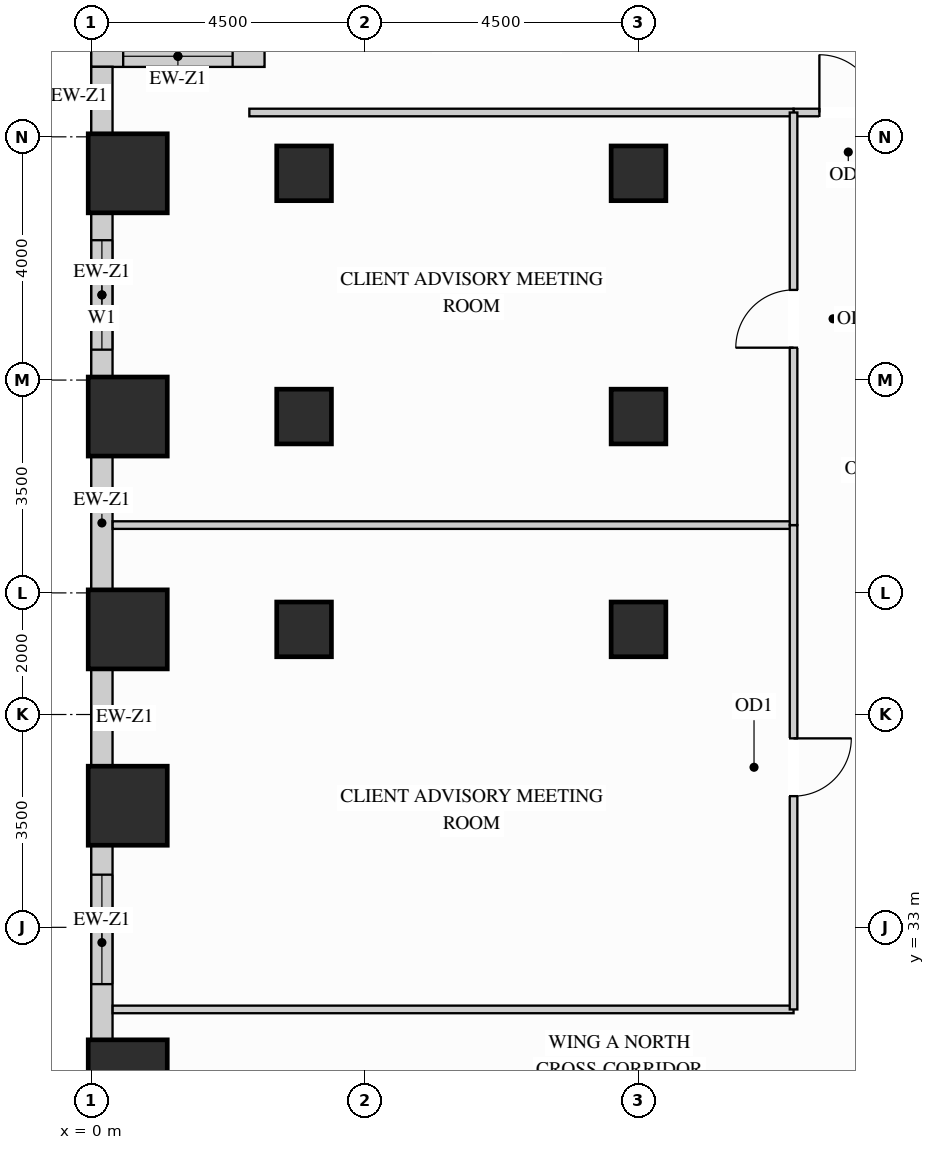
"""IFC4 building model, lengths in metres.
Left out: names, types, materials, properties, quantities, classifications, styles, units other than length and angle.
Written with IfcOpenShell. Run it as: python <this file> out.ifc"""

import sys

from ifc_helpers import new_model, si_unit, direction, frame, frame_2d, origin, origin_2d, place, context, subcontext, project, spatial, rectangle, extrude, source, transform, mapped, element, fill, save


model = new_model("IFC4")
c1 = context("Model", 3, precision=1e-05, world=origin(), true_north=direction((0.0, 1.0)))
c2 = subcontext(c1, "Body", "Model", "MODEL_VIEW")
j1 = project(units=[si_unit("LENGTHUNIT", "METRE"), si_unit("PLANEANGLEUNIT", "RADIAN")], contexts=[c1])
p1 = place(None, origin())
s1 = spatial("IfcSite", under=j1, at=p1, CompositionType="ELEMENT")
p2 = place(p1, origin())
s2 = spatial("IfcBuilding", under=s1, at=p2, CompositionType="ELEMENT")
p3 = place(p2, frame((0.0, 0.0, 40.5)))
s3 = spatial("IfcBuildingStorey", under=s2, at=p3, CompositionType="ELEMENT", Elevation=40.5)
m1 = source(origin(), c2, "Body", "SweptSolid", [
    extrude(rectangle(XDim=0.9, YDim=0.9, at=origin_2d()), origin(), (0.0, 0.0, 1.0), 3.38),
])
for number, where, z_axis, x_axis in (
    (1, (3.5, 37.9, 0.0), (0.0, 0.0, 1.0), (1.0, 0.0, 0.0)),
    (2, (3.5, 41.4, 0.0), (0.0, 0.0, 1.0), (1.0, 0.0, 0.0)),
    (3, (3.5, 45.4, 0.0), (0.0, 0.0, 1.0), (1.0, 0.0, 0.0)),
    (4, (9.0, 37.9, 0.0), (0.0, 0.0, 1.0), (1.0, 0.0, 0.0)),
    (5, (9.0, 41.4, 0.0), (0.0, 0.0, 1.0), (1.0, 0.0, 0.0)),
    (6, (9.0, 45.4, 0.0), (0.0, 0.0, 1.0), (1.0, 0.0, 0.0)),
):
    element("IfcColumn", number, at=place(p3, frame(where, z_axis=z_axis, x_axis=x_axis)), inside=s3, PredefinedType="COLUMN", context=c2, shape_type="MappedRepresentation", body=[
        mapped(m1, transform((0.0, 0.0, 0.0), x_axis=(1.0, 0.0, 0.0), y_axis=(0.0, 1.0, 0.0), z_axis=(0.0, 0.0, 1.0))),
    ])
m2 = source(origin(), c2, "Body", "SweptSolid", [
    extrude(rectangle(XDim=1.3, YDim=1.3, at=origin_2d()), origin(), (0.0, 0.0, 1.0), 3.38),
])
for number, where, z_axis, x_axis in (
    (7, (0.6, 30.5, 0.0), (0.0, 0.0, 1.0), (1.0, 0.0, 0.0)),
    (8, (0.6, 35.0, 0.0), (0.0, 0.0, 1.0), (1.0, 0.0, 0.0)),
    (9, (0.6, 37.9, 0.0), (0.0, 0.0, 1.0), (1.0, 0.0, 0.0)),
    (10, (0.6, 41.4, 0.0), (0.0, 0.0, 1.0), (1.0, 0.0, 0.0)),
    (11, (0.6, 45.4, 0.0), (0.0, 0.0, 1.0), (1.0, 0.0, 0.0)),
):
    element("IfcColumn", number, at=place(p3, frame(where, z_axis=z_axis, x_axis=x_axis)), inside=s3, PredefinedType="COLUMN", context=c2, shape_type="MappedRepresentation", body=[
        mapped(m2, transform((0.0, 0.0, 0.0), x_axis=(1.0, 0.0, 0.0), y_axis=(0.0, 1.0, 0.0), z_axis=(0.0, 0.0, 1.0))),
    ])
p4 = place(p3, frame((2.85, 47.325, 0.0), z_axis=(0.0, 0.0, 1.0), x_axis=(-1.0, 0.0, 0.0)))
e12 = element("IfcWall", 12, at=p4, inside=s3, PredefinedType="SOLIDWALL", context=c2, shape_type="SweptSolid", body=[
    extrude(rectangle(XDim=2.85, YDim=0.35, at=frame_2d((1.425, 0.0))), origin(), (0.0, 0.0, 1.0), 3.365),
])
p5 = place(p4, frame((0.525, 0.0, 0.78)))
e13 = element("IfcOpeningElement", 13, at=p5, cuts=e12, PredefinedType="OPENING", context=c2, shape_type="SweptSolid", body=[
    extrude(rectangle(XDim=1.8, YDim=2.1, at=frame_2d((0.9, 1.05))), frame((0.0, 0.185, 0.0), z_axis=(0.0, -1.0, 0.0), x_axis=(1.0, 0.0, 0.0)), (0.0, 0.0, 1.0), 0.37),
])
m3 = source(origin(), c2, "Body", "SweptSolid", [
    extrude(rectangle(XDim=1.104, YDim=0.35, at=frame_2d((0.552, 0.0))), origin(), (0.0, 0.0, 1.0), 3.365),
])
p6 = place(p3, frame((0.175, 47.152, 0.0), z_axis=(0.0, 0.0, 1.0), x_axis=(0.0, -1.0, 0.0)))
e14 = element("IfcWall", 14, at=p6, inside=s3, PredefinedType="SOLIDWALL", context=c2, shape_type="MappedRepresentation", body=[
    mapped(m3, transform((0.0, 0.0, 0.0), x_axis=(1.0, 0.0, 0.0), y_axis=(0.0, 1.0, 0.0), z_axis=(0.0, 0.0, 1.0))),
])
p7 = place(p3, frame((0.175, 44.752, 0.0), z_axis=(0.0, 0.0, 1.0), x_axis=(0.0, -1.0, 0.0)))
e15 = element("IfcWall", 15, at=p7, inside=s3, PredefinedType="SOLIDWALL", context=c2, shape_type="SweptSolid", body=[
    extrude(rectangle(XDim=2.704, YDim=0.35, at=frame_2d((1.352, 0.0))), origin(), (0.0, 0.0, 1.0), 2.51),
])
p8 = place(p7, frame((0.452, 0.0, 0.78)))
e16 = element("IfcOpeningElement", 16, at=p8, cuts=e15, PredefinedType="OPENING", context=c2, shape_type="SweptSolid", body=[
    extrude(rectangle(XDim=1.8, YDim=1.55, at=frame_2d((0.9, 0.775))), frame((0.0, 0.185, 0.0), z_axis=(0.0, -1.0, 0.0), x_axis=(1.0, 0.0, 0.0)), (0.0, 0.0, 1.0), 0.37),
])
m4 = source(origin(), c2, "Body", "SweptSolid", [
    extrude(rectangle(XDim=2.204, YDim=0.35, at=frame_2d((1.102, 0.0))), origin(), (0.0, 0.0, 1.0), 2.51),
])
p9 = place(p3, frame((0.175, 40.752, 0.0), z_axis=(0.0, 0.0, 1.0), x_axis=(0.0, -1.0, 0.0)))
e17 = element("IfcWall", 17, at=p9, inside=s3, PredefinedType="SOLIDWALL", context=c2, shape_type="MappedRepresentation", body=[
    mapped(m4, transform((0.0, 0.0, 0.0), x_axis=(1.0, 0.0, 0.0), y_axis=(0.0, 1.0, 0.0), z_axis=(0.0, 0.0, 1.0))),
])
m5 = source(origin(), c2, "Body", "SweptSolid", [
    extrude(rectangle(XDim=1.604, YDim=0.35, at=frame_2d((0.802, 0.0))), origin(), (0.0, 0.0, 1.0), 2.51),
])
p10 = place(p3, frame((0.175, 37.252, 0.0), z_axis=(0.0, 0.0, 1.0), x_axis=(0.0, -1.0, 0.0)))
e18 = element("IfcWall", 18, at=p10, inside=s3, PredefinedType="SOLIDWALL", context=c2, shape_type="MappedRepresentation", body=[
    mapped(m5, transform((0.0, 0.0, 0.0), x_axis=(1.0, 0.0, 0.0), y_axis=(0.0, 1.0, 0.0), z_axis=(0.0, 0.0, 1.0))),
])
p11 = place(p3, frame((0.175, 34.352, 0.0), z_axis=(0.0, 0.0, 1.0), x_axis=(0.0, -1.0, 0.0)))
e19 = element("IfcWall", 19, at=p11, inside=s3, PredefinedType="SOLIDWALL", context=c2, shape_type="SweptSolid", body=[
    extrude(rectangle(XDim=3.204, YDim=0.35, at=frame_2d((1.602, 0.0))), origin(), (0.0, 0.0, 1.0), 2.51),
])
p12 = place(p11, frame((0.486, 0.0, 0.78)))
e20 = element("IfcOpeningElement", 20, at=p12, cuts=e19, PredefinedType="OPENING", context=c2, shape_type="SweptSolid", body=[
    extrude(rectangle(XDim=1.8, YDim=1.55, at=frame_2d((0.9, 0.775))), frame((0.0, 0.185, 0.0), z_axis=(0.0, -1.0, 0.0), x_axis=(1.0, 0.0, 0.0)), (0.0, 0.0, 1.0), 0.37),
])
m6 = source(origin(), c2, "Body", "SweptSolid", [
    extrude(rectangle(XDim=11.198, YDim=0.125, at=frame_2d((5.599, 0.0))), origin(), (0.0, 0.0, 1.0), 2.828),
])
for number, where, z_axis, x_axis in (
    (21, (0.352, 31.65, 0.0), (0.0, 0.0, 1.0), (1.0, 0.0, 0.0)),
    (22, (0.352, 39.615, 0.0), (0.0, 0.0, 1.0), (1.0, 0.0, 0.0)),
):
    element("IfcWall", number, at=place(p3, frame(where, z_axis=z_axis, x_axis=x_axis)), inside=s3, PredefinedType="PARTITIONING", context=c2, shape_type="MappedRepresentation", body=[
        mapped(m6, transform((0.0, 0.0, 0.0), x_axis=(1.0, 0.0, 0.0), y_axis=(0.0, 1.0, 0.0), z_axis=(0.0, 0.0, 1.0))),
    ])
p13 = place(p3, frame((11.55, 46.4, 0.0), z_axis=(0.0, 0.0, 1.0), x_axis=(1.0, 0.0, 0.0)))
e23 = element("IfcWall", 23, at=p13, inside=s3, PredefinedType="PARTITIONING", context=c2, shape_type="SweptSolid", body=[
    extrude(rectangle(XDim=1.8, YDim=0.125, at=frame_2d((0.9, 0.0))), origin(), (0.0, 0.0, 1.0), 3.365),
])
p14 = place(p13, frame((0.425, 0.0, 0.0)))
e24 = element("IfcOpeningElement", 24, at=p14, cuts=e23, PredefinedType="OPENING", context=c2, shape_type="SweptSolid", body=[
    extrude(rectangle(XDim=0.95, YDim=2.15, at=frame_2d((0.475, 1.075))), frame((0.0, 0.073, 0.0), z_axis=(0.0, -1.0, 0.0), x_axis=(1.0, 0.0, 0.0)), (0.0, 0.0, 1.0), 0.145),
])
m7 = source(origin(), c2, "Body", "SweptSolid", [
    extrude(rectangle(XDim=8.95, YDim=0.125, at=frame_2d((4.475, 0.0))), origin(), (0.0, 0.0, 1.0), 3.365),
])
p15 = place(p3, frame((2.6, 46.4, 0.0), z_axis=(0.0, 0.0, 1.0), x_axis=(1.0, 0.0, 0.0)))
e25 = element("IfcWall", 25, at=p15, inside=s3, PredefinedType="PARTITIONING", context=c2, shape_type="MappedRepresentation", body=[
    mapped(m7, transform((0.0, 0.0, 0.0), x_axis=(1.0, 0.0, 0.0), y_axis=(0.0, 1.0, 0.0), z_axis=(0.0, 0.0, 1.0))),
])
p16 = place(p3, frame((11.55, 31.65, 0.0), z_axis=(0.0, 0.0, 1.0), x_axis=(0.0, 1.0, 0.0)))
e26 = element("IfcWall", 26, at=p16, inside=s3, PredefinedType="PARTITIONING", context=c2, shape_type="SweptSolid", body=[
    extrude(rectangle(XDim=7.965, YDim=0.125, at=frame_2d((3.982, 0.0))), origin(), (0.0, 0.0, 1.0), 3.365),
])
p17 = place(p16, frame((3.508, 0.0, 0.0)))
e27 = element("IfcOpeningElement", 27, at=p17, cuts=e26, PredefinedType="OPENING", context=c2, shape_type="SweptSolid", body=[
    extrude(rectangle(XDim=0.95, YDim=2.15, at=frame_2d((0.475, 1.075))), frame((0.0, 0.073, 0.0), z_axis=(0.0, -1.0, 0.0), x_axis=(1.0, 0.0, 0.0)), (0.0, 0.0, 1.0), 0.145),
])
p18 = place(p3, frame((11.55, 39.615, 0.0), z_axis=(0.0, 0.0, 1.0), x_axis=(0.0, 1.0, 0.0)))
e28 = element("IfcWall", 28, at=p18, inside=s3, PredefinedType="PARTITIONING", context=c2, shape_type="SweptSolid", body=[
    extrude(rectangle(XDim=6.785, YDim=0.125, at=frame_2d((3.393, 0.0))), origin(), (0.0, 0.0, 1.0), 3.365),
])
p19 = place(p18, frame((2.917, 0.0, 0.0)))
e29 = element("IfcOpeningElement", 29, at=p19, cuts=e28, PredefinedType="OPENING", context=c2, shape_type="SweptSolid", body=[
    extrude(rectangle(XDim=0.95, YDim=2.15, at=frame_2d((0.475, 1.075))), frame((0.0, 0.073, 0.0), z_axis=(0.0, -1.0, 0.0), x_axis=(1.0, 0.0, 0.0)), (0.0, 0.0, 1.0), 0.145),
])
m8 = source(origin(), c2, "Body", "SweptSolid", [
    extrude(rectangle(XDim=0.95, YDim=2.15, at=frame_2d((0.475, 1.075))), frame((0.0, 0.025, 0.0), z_axis=(0.0, -1.0, 0.0), x_axis=(1.0, 0.0, 0.0)), (0.0, 0.0, 1.0), 0.05),
])
p20 = place(p14, origin())
e30 = element("IfcDoor", 30, at=p20, inside=s3, OperationType="SINGLE_SWING_LEFT", PredefinedType="DOOR", context=c2, shape_type="MappedRepresentation", body=[
    mapped(m8, transform((0.0, 0.0, 0.0), x_axis=(1.0, 0.0, 0.0), y_axis=(0.0, 1.0, 0.0), z_axis=(0.0, 0.0, 1.0))),
])
fill(e24, e30)
p21 = place(p17, origin())
e31 = element("IfcDoor", 31, at=p21, inside=s3, OperationType="SINGLE_SWING_RIGHT", PredefinedType="DOOR", context=c2, shape_type="MappedRepresentation", body=[
    mapped(m8, transform((0.0, 0.0, 0.0), x_axis=(1.0, 0.0, 0.0), y_axis=(0.0, 1.0, 0.0), z_axis=(0.0, 0.0, 1.0))),
])
fill(e27, e31)
p22 = place(p19, origin())
e32 = element("IfcDoor", 32, at=p22, inside=s3, OperationType="SINGLE_SWING_LEFT", PredefinedType="DOOR", context=c2, shape_type="MappedRepresentation", body=[
    mapped(m8, transform((0.0, 0.0, 0.0), x_axis=(1.0, 0.0, 0.0), y_axis=(0.0, 1.0, 0.0), z_axis=(0.0, 0.0, 1.0))),
])
fill(e29, e32)
m9 = source(origin(), c2, "Body", "SweptSolid", [
    extrude(rectangle(XDim=1.8, YDim=2.1, at=frame_2d((0.9, 1.05))), frame((0.0, 0.03, 0.0), z_axis=(0.0, -1.0, 0.0), x_axis=(1.0, 0.0, 0.0)), (0.0, 0.0, 1.0), 0.06),
])
p23 = place(p5, origin())
e33 = element("IfcWindow", 33, at=p23, inside=s3, PartitioningType="SINGLE_PANEL", PredefinedType="WINDOW", context=c2, shape_type="MappedRepresentation", body=[
    mapped(m9, transform((0.0, 0.0, 0.0), x_axis=(1.0, 0.0, 0.0), y_axis=(0.0, 1.0, 0.0), z_axis=(0.0, 0.0, 1.0))),
])
fill(e13, e33)
m10 = source(origin(), c2, "Body", "SweptSolid", [
    extrude(rectangle(XDim=1.8, YDim=1.55, at=frame_2d((0.9, 0.775))), frame((0.0, 0.03, 0.0), z_axis=(0.0, -1.0, 0.0), x_axis=(1.0, 0.0, 0.0)), (0.0, 0.0, 1.0), 0.06),
])
p24 = place(p8, origin())
e34 = element("IfcWindow", 34, at=p24, inside=s3, PartitioningType="SINGLE_PANEL", PredefinedType="WINDOW", context=c2, shape_type="MappedRepresentation", body=[
    mapped(m10, transform((0.0, 0.0, 0.0), x_axis=(1.0, 0.0, 0.0), y_axis=(0.0, 1.0, 0.0), z_axis=(0.0, 0.0, 1.0))),
])
fill(e16, e34)
p25 = place(p12, origin())
e35 = element("IfcWindow", 35, at=p25, inside=s3, PartitioningType="SINGLE_PANEL", PredefinedType="WINDOW", context=c2, shape_type="MappedRepresentation", body=[
    mapped(m10, transform((0.0, 0.0, 0.0), x_axis=(1.0, 0.0, 0.0), y_axis=(0.0, 1.0, 0.0), z_axis=(0.0, 0.0, 1.0))),
])
fill(e20, e35)
save(model, sys.argv[1])
